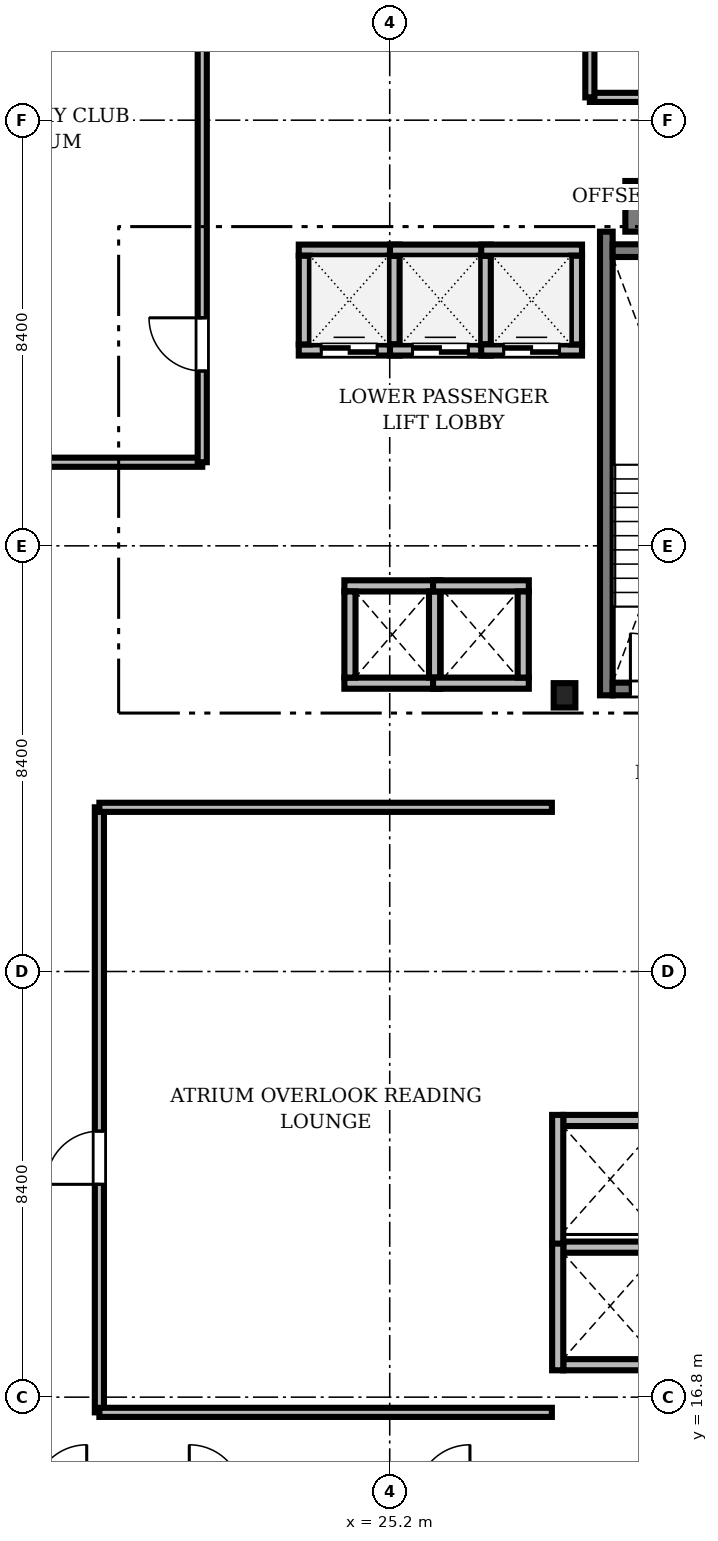
"""IFC4 building model, lengths in metres.
Left out: names, types, materials, properties, quantities, classifications, styles, units other than length and angle.
Written with IfcOpenShell. Run it as: python <this file> out.ifc"""

import sys

from ifc_helpers import new_model, si_unit, direction, frame, frame_2d, origin, origin_2d, place, context, subcontext, project, spatial, rectangle, i_section, extrude, source, transform, mapped, element, fill, save


model = new_model("IFC4")
c1 = context("Model", 3, precision=1e-05, world=origin(), true_north=direction((0.0, 1.0)))
c2 = subcontext(c1, "Body", "Model", "MODEL_VIEW")
j1 = project(units=[si_unit("LENGTHUNIT", "METRE"), si_unit("PLANEANGLEUNIT", "RADIAN")], contexts=[c1])
p1 = place(None, origin())
s1 = spatial("IfcSite", under=j1, at=p1, CompositionType="ELEMENT")
p2 = place(p1, origin())
s2 = spatial("IfcBuilding", under=s1, at=p2, CompositionType="ELEMENT")
p3 = place(p2, frame((0.0, 0.0, 82.35)))
s3 = spatial("IfcBuildingStorey", under=s2, at=p3, CompositionType="ELEMENT", Elevation=82.35)
m1 = source(origin(), c2, "Body", "SweptSolid", [
    extrude(rectangle(XDim=17.52, YDim=1.0, at=frame_2d((8.76, 0.0))), origin(), (0.0, 0.0, 1.0), 3.41),
])
p4 = place(p3, frame((29.85, 40.3, 0.0), z_axis=(0.0, 0.0, 1.0), x_axis=(1.0, 0.0, 0.0)))
e1 = element("IfcWall", 1, at=p4, inside=s3, PredefinedType="SHEAR", context=c2, shape_type="MappedRepresentation", body=[
    mapped(m1, transform((0.0, 0.0, 0.0), scale=1.0)),
])
m2 = source(origin(), c2, "Body", "SweptSolid", [
    extrude(i_section(OverallWidth=0.428, OverallDepth=0.481, WebThickness=0.04, FlangeThickness=0.063, FilletRadius=0.015, at=origin_2d()), origin(), (0.0, 0.0, 1.0), 3.41),
])
p5 = place(p3, frame((28.65, 30.65, 0.0), z_axis=(0.0, 0.0, 1.0), x_axis=(1.0, 0.0, 0.0)))
e2 = element("IfcColumn", 2, at=p5, inside=s3, PredefinedType="COLUMN", context=c2, shape_type="MappedRepresentation", body=[
    mapped(m2, transform((0.0, 0.0, 0.0), scale=1.0)),
])
m3 = source(origin(), c2, "Body", "SweptSolid", [
    extrude(rectangle(XDim=9.15, YDim=0.25, at=frame_2d((4.575, 0.0))), origin(), (0.0, 0.0, 1.0), 3.45),
])
p6 = place(p3, frame((29.475, 30.65, 0.0), z_axis=(0.0, 0.0, 1.0), x_axis=(0.0, 1.0, 0.0)))
e3 = element("IfcWall", 3, at=p6, inside=s3, PredefinedType="SOLIDWALL", context=c2, shape_type="MappedRepresentation", body=[
    mapped(m3, transform((0.0, 0.0, 0.0), scale=1.0)),
])
m4 = source(origin(), c2, "Body", "SweptSolid", [
    extrude(rectangle(XDim=3.15, YDim=0.25, at=frame_2d((1.575, 0.0))), origin(), (0.0, 0.0, 1.0), 3.45),
])
p7 = place(p3, frame((29.6, 39.425, 0.0), z_axis=(0.0, 0.0, 1.0), x_axis=(1.0, 0.0, 0.0)))
e4 = element("IfcWall", 4, at=p7, inside=s3, PredefinedType="SOLIDWALL", context=c2, shape_type="MappedRepresentation", body=[
    mapped(m4, transform((0.0, 0.0, 0.0), scale=1.0)),
])
p8 = place(p3, frame((29.6, 30.775, 0.0), z_axis=(0.0, 0.0, 1.0), x_axis=(1.0, 0.0, 0.0)))
e5 = element("IfcWall", 5, at=p8, inside=s3, PredefinedType="SOLIDWALL", context=c2, shape_type="MappedRepresentation", body=[
    mapped(m4, transform((0.0, 0.0, 0.0), scale=1.0)),
])
m5 = source(origin(), c2, "Body", "SweptSolid", [
    extrude(rectangle(XDim=1.1, YDim=2.2, at=frame_2d((0.55, 1.1))), frame((0.0, 0.135, 0.0), z_axis=(0.0, -1.0, 0.0), x_axis=(1.0, 0.0, 0.0)), (0.0, 0.0, 1.0), 0.27),
])
p9 = place(p8, frame((0.35, 0.0, 0.0)))
e6 = element("IfcOpeningElement", 6, at=p9, cuts=e5, PredefinedType="OPENING", context=c2, shape_type="MappedRepresentation", body=[
    mapped(m5, transform((0.0, 0.0, 0.0), scale=1.0)),
])
m6 = source(origin(), c2, "Body", "SweptSolid", [
    extrude(rectangle(XDim=1.99, YDim=0.22, at=frame_2d((0.995, 0.0))), origin(), (0.0, 0.0, 1.0), 3.41),
])
p10 = place(p3, frame((23.405, 37.465, 0.0), z_axis=(0.0, 0.0, 1.0), x_axis=(1.0, 0.0, 0.0)))
e7 = element("IfcWall", 7, at=p10, inside=s3, PredefinedType="SOLIDWALL", context=c2, shape_type="MappedRepresentation", body=[
    mapped(m6, transform((0.0, 0.0, 0.0), scale=1.0)),
])
m7 = source(origin(), c2, "Body", "SweptSolid", [
    extrude(rectangle(XDim=1.1, YDim=2.2, at=frame_2d((0.55, 1.1))), frame((0.0, 0.12, 0.0), z_axis=(0.0, -1.0, 0.0), x_axis=(1.0, 0.0, 0.0)), (0.0, 0.0, 1.0), 0.24),
])
p11 = place(p10, frame((0.445, 0.0, 0.0)))
e8 = element("IfcOpeningElement", 8, at=p11, cuts=e7, PredefinedType="OPENING", context=c2, shape_type="MappedRepresentation", body=[
    mapped(m7, transform((0.0, 0.0, 0.0), scale=1.0)),
])
p12 = place(p3, frame((23.405, 39.435, 0.0), z_axis=(0.0, 0.0, 1.0), x_axis=(1.0, 0.0, 0.0)))
e9 = element("IfcWall", 9, at=p12, inside=s3, PredefinedType="SOLIDWALL", context=c2, shape_type="MappedRepresentation", body=[
    mapped(m6, transform((0.0, 0.0, 0.0), scale=1.0)),
])
m8 = source(origin(), c2, "Body", "SweptSolid", [
    extrude(rectangle(XDim=1.75, YDim=0.22, at=frame_2d((0.875, 0.0))), origin(), (0.0, 0.0, 1.0), 3.41),
])
for number, where, z_axis, x_axis in (
    (10, (23.515, 37.575, 0.0), (0.0, 0.0, 1.0), (0.0, 1.0, 0.0)),
    (11, (25.285, 37.575, 0.0), (0.0, 0.0, 1.0), (0.0, 1.0, 0.0)),
):
    element("IfcWall", number, at=place(p3, frame(where, z_axis=z_axis, x_axis=x_axis)), inside=s3, PredefinedType="SOLIDWALL", context=c2, shape_type="MappedRepresentation", body=[
        mapped(m8, transform((0.0, 0.0, 0.0), scale=1.0)),
    ])
p13 = place(p3, frame((25.205, 37.465, 0.0), z_axis=(0.0, 0.0, 1.0), x_axis=(1.0, 0.0, 0.0)))
e12 = element("IfcWall", 12, at=p13, inside=s3, PredefinedType="SOLIDWALL", context=c2, shape_type="MappedRepresentation", body=[
    mapped(m6, transform((0.0, 0.0, 0.0), scale=1.0)),
])
p14 = place(p13, frame((0.445, 0.0, 0.0)))
e13 = element("IfcOpeningElement", 13, at=p14, cuts=e12, PredefinedType="OPENING", context=c2, shape_type="MappedRepresentation", body=[
    mapped(m7, transform((0.0, 0.0, 0.0), scale=1.0)),
])
p15 = place(p3, frame((25.205, 39.435, 0.0), z_axis=(0.0, 0.0, 1.0), x_axis=(1.0, 0.0, 0.0)))
e14 = element("IfcWall", 14, at=p15, inside=s3, PredefinedType="SOLIDWALL", context=c2, shape_type="MappedRepresentation", body=[
    mapped(m6, transform((0.0, 0.0, 0.0), scale=1.0)),
])
p16 = place(p3, frame((27.085, 37.575, 0.0), z_axis=(0.0, 0.0, 1.0), x_axis=(0.0, 1.0, 0.0)))
e15 = element("IfcWall", 15, at=p16, inside=s3, PredefinedType="SOLIDWALL", context=c2, shape_type="MappedRepresentation", body=[
    mapped(m8, transform((0.0, 0.0, 0.0), scale=1.0)),
])
m9 = source(origin(), c2, "Body", "SweptSolid", [
    extrude(rectangle(XDim=1.99, YDim=0.22, at=frame_2d((0.995, 0.0))), origin(), (0.0, 0.0, 1.0), 3.41),
])
p17 = place(p3, frame((27.005, 37.465, 0.0), z_axis=(0.0, 0.0, 1.0), x_axis=(1.0, 0.0, 0.0)))
e16 = element("IfcWall", 16, at=p17, inside=s3, PredefinedType="SOLIDWALL", context=c2, shape_type="MappedRepresentation", body=[
    mapped(m9, transform((0.0, 0.0, 0.0), scale=1.0)),
])
p18 = place(p17, frame((0.445, 0.0, 0.0)))
e17 = element("IfcOpeningElement", 17, at=p18, cuts=e16, PredefinedType="OPENING", context=c2, shape_type="MappedRepresentation", body=[
    mapped(m7, transform((0.0, 0.0, 0.0), scale=1.0)),
])
p19 = place(p3, frame((27.005, 39.435, 0.0), z_axis=(0.0, 0.0, 1.0), x_axis=(1.0, 0.0, 0.0)))
e18 = element("IfcWall", 18, at=p19, inside=s3, PredefinedType="SOLIDWALL", context=c2, shape_type="MappedRepresentation", body=[
    mapped(m9, transform((0.0, 0.0, 0.0), scale=1.0)),
])
p20 = place(p3, frame((28.885, 37.575, 0.0), z_axis=(0.0, 0.0, 1.0), x_axis=(0.0, 1.0, 0.0)))
e19 = element("IfcWall", 19, at=p20, inside=s3, PredefinedType="SOLIDWALL", context=c2, shape_type="MappedRepresentation", body=[
    mapped(m8, transform((0.0, 0.0, 0.0), scale=1.0)),
])
m10 = source(origin(), c2, "Body", "SweptSolid", [
    extrude(rectangle(XDim=1.89, YDim=0.22, at=frame_2d((0.945, 0.0))), origin(), (0.0, 0.0, 1.0), 3.41),
])
for number, where, z_axis, x_axis in (
    (20, (24.305, 30.89, 0.0), (0.0, 0.0, 1.0), (1.0, 0.0, 0.0)),
    (21, (24.305, 32.81, 0.0), (0.0, 0.0, 1.0), (1.0, 0.0, 0.0)),
):
    element("IfcWall", number, at=place(p3, frame(where, z_axis=z_axis, x_axis=x_axis)), inside=s3, PredefinedType="SOLIDWALL", context=c2, shape_type="MappedRepresentation", body=[
        mapped(m10, transform((0.0, 0.0, 0.0), scale=1.0)),
    ])
m11 = source(origin(), c2, "Body", "SweptSolid", [
    extrude(rectangle(XDim=1.7, YDim=0.22, at=frame_2d((0.85, 0.0))), origin(), (0.0, 0.0, 1.0), 3.41),
])
for number, where, z_axis, x_axis in (
    (22, (24.415, 31.0, 0.0), (0.0, 0.0, 1.0), (0.0, 1.0, 0.0)),
    (23, (26.085, 31.0, 0.0), (0.0, 0.0, 1.0), (0.0, 1.0, 0.0)),
):
    element("IfcWall", number, at=place(p3, frame(where, z_axis=z_axis, x_axis=x_axis)), inside=s3, PredefinedType="SOLIDWALL", context=c2, shape_type="MappedRepresentation", body=[
        mapped(m11, transform((0.0, 0.0, 0.0), scale=1.0)),
    ])
for number, where, z_axis, x_axis in (
    (24, (26.055, 30.89, 0.0), (0.0, 0.0, 1.0), (1.0, 0.0, 0.0)),
    (25, (26.055, 32.81, 0.0), (0.0, 0.0, 1.0), (1.0, 0.0, 0.0)),
):
    element("IfcWall", number, at=place(p3, frame(where, z_axis=z_axis, x_axis=x_axis)), inside=s3, PredefinedType="SOLIDWALL", context=c2, shape_type="MappedRepresentation", body=[
        mapped(m10, transform((0.0, 0.0, 0.0), scale=1.0)),
    ])
p21 = place(p3, frame((27.835, 31.0, 0.0), z_axis=(0.0, 0.0, 1.0), x_axis=(0.0, 1.0, 0.0)))
e26 = element("IfcWall", 26, at=p21, inside=s3, PredefinedType="SOLIDWALL", context=c2, shape_type="MappedRepresentation", body=[
    mapped(m11, transform((0.0, 0.0, 0.0), scale=1.0)),
])
m12 = source(origin(), c2, "Body", "SweptSolid", [
    extrude(rectangle(XDim=1.85, YDim=0.22, at=frame_2d((0.925, 0.0))), origin(), (0.0, 0.0, 1.0), 3.41),
])
for number, where, z_axis, x_axis in (
    (27, (28.625, 17.44, 0.0), (0.0, 0.0, 1.0), (1.0, 0.0, 0.0)),
    (28, (28.625, 19.76, 0.0), (0.0, 0.0, 1.0), (1.0, 0.0, 0.0)),
):
    element("IfcWall", number, at=place(p3, frame(where, z_axis=z_axis, x_axis=x_axis)), inside=s3, PredefinedType="SOLIDWALL", context=c2, shape_type="MappedRepresentation", body=[
        mapped(m12, transform((0.0, 0.0, 0.0), scale=1.0)),
    ])
m13 = source(origin(), c2, "Body", "SweptSolid", [
    extrude(rectangle(XDim=2.54, YDim=0.22, at=frame_2d((1.27, 0.0))), origin(), (0.0, 0.0, 1.0), 3.41),
])
p22 = place(p3, frame((28.515, 17.33, 0.0), z_axis=(0.0, 0.0, 1.0), x_axis=(0.0, 1.0, 0.0)))
e29 = element("IfcWall", 29, at=p22, inside=s3, PredefinedType="SOLIDWALL", context=c2, shape_type="MappedRepresentation", body=[
    mapped(m13, transform((0.0, 0.0, 0.0), scale=1.0)),
])
p23 = place(p3, frame((28.625, 22.26, 0.0), z_axis=(0.0, 0.0, 1.0), x_axis=(1.0, 0.0, 0.0)))
e30 = element("IfcWall", 30, at=p23, inside=s3, PredefinedType="SOLIDWALL", context=c2, shape_type="MappedRepresentation", body=[
    mapped(m12, transform((0.0, 0.0, 0.0), scale=1.0)),
])
p24 = place(p3, frame((28.515, 19.83, 0.0), z_axis=(0.0, 0.0, 1.0), x_axis=(0.0, 1.0, 0.0)))
e31 = element("IfcWall", 31, at=p24, inside=s3, PredefinedType="SOLIDWALL", context=c2, shape_type="MappedRepresentation", body=[
    mapped(m13, transform((0.0, 0.0, 0.0), scale=1.0)),
])
m14 = source(origin(), c2, "Body", "SweptSolid", [
    extrude(rectangle(XDim=19.428, YDim=0.18, at=frame_2d((9.714, 0.0))), origin(), (0.0, 0.0, 1.0), 2.652),
])
p25 = place(p3, frame((29.15, 42.45, 0.0), z_axis=(0.0, 0.0, 1.0), x_axis=(1.0, 0.0, 0.0)))
e32 = element("IfcWall", 32, at=p25, inside=s3, PredefinedType="PARTITIONING", context=c2, shape_type="MappedRepresentation", body=[
    mapped(m14, transform((0.0, 0.0, 0.0), scale=1.0)),
])
m15 = source(origin(), c2, "Body", "SweptSolid", [
    extrude(rectangle(XDim=1.05, YDim=2.2, at=frame_2d((0.525, 1.1))), frame((0.0, 0.1, 0.0), z_axis=(0.0, -1.0, 0.0), x_axis=(1.0, 0.0, 0.0)), (0.0, 0.0, 1.0), 0.2),
])
p26 = place(p25, frame((4.5, 0.0, 0.0)))
e33 = element("IfcOpeningElement", 33, at=p26, cuts=e32, PredefinedType="OPENING", context=c2, shape_type="MappedRepresentation", body=[
    mapped(m15, transform((0.0, 0.0, 0.0), scale=1.0)),
])
m16 = source(origin(), c2, "Body", "SweptSolid", [
    extrude(rectangle(XDim=19.078, YDim=0.18, at=frame_2d((9.539, 0.0))), origin(), (0.0, 0.0, 1.0), 2.652),
])
p27 = place(p3, frame((2.422, 35.25, 0.0), z_axis=(0.0, 0.0, 1.0), x_axis=(1.0, 0.0, 0.0)))
e34 = element("IfcWall", 34, at=p27, inside=s3, PredefinedType="PARTITIONING", context=c2, shape_type="MappedRepresentation", body=[
    mapped(m16, transform((0.0, 0.0, 0.0), scale=1.0)),
])
p28 = place(p27, frame((14.843, 0.0, 0.0)))
e35 = element("IfcOpeningElement", 35, at=p28, cuts=e34, PredefinedType="OPENING", context=c2, shape_type="MappedRepresentation", body=[
    mapped(m15, transform((0.0, 0.0, 0.0), scale=1.0)),
])
m17 = source(origin(), c2, "Body", "SweptSolid", [
    extrude(rectangle(XDim=13.028, YDim=0.18, at=frame_2d((6.514, 0.0))), origin(), (0.0, 0.0, 1.0), 2.652),
])
p29 = place(p3, frame((21.5, 35.25, 0.0), z_axis=(0.0, 0.0, 1.0), x_axis=(0.0, 1.0, 0.0)))
e36 = element("IfcWall", 36, at=p29, inside=s3, PredefinedType="PARTITIONING", context=c2, shape_type="MappedRepresentation", body=[
    mapped(m17, transform((0.0, 0.0, 0.0), scale=1.0)),
])
p30 = place(p29, frame((1.8, 0.0, 0.0)))
e37 = element("IfcOpeningElement", 37, at=p30, cuts=e36, PredefinedType="OPENING", context=c2, shape_type="MappedRepresentation", body=[
    mapped(m15, transform((0.0, 0.0, 0.0), scale=1.0)),
])
m18 = source(origin(), c2, "Body", "SweptSolid", [
    extrude(rectangle(XDim=11.94, YDim=0.18, at=frame_2d((5.97, 0.0))), origin(), (0.0, 0.0, 1.0), 2.802),
])
p31 = place(p3, frame((19.47, 16.5, 0.0), z_axis=(0.0, 0.0, 1.0), x_axis=(0.0, 1.0, 0.0)))
e38 = element("IfcWall", 38, at=p31, inside=s3, PredefinedType="PARTITIONING", context=c2, shape_type="MappedRepresentation", body=[
    mapped(m18, transform((0.0, 0.0, 0.0), scale=1.0)),
])
p32 = place(p31, frame((4.5, 0.0, 0.0)))
e39 = element("IfcOpeningElement", 39, at=p32, cuts=e38, PredefinedType="OPENING", context=c2, shape_type="MappedRepresentation", body=[
    mapped(m15, transform((0.0, 0.0, 0.0), scale=1.0)),
])
m19 = source(origin(), c2, "Body", "SweptSolid", [
    extrude(rectangle(XDim=8.93, YDim=0.18, at=frame_2d((4.465, 0.0))), origin(), (0.0, 0.0, 1.0), 2.802),
])
p33 = place(p3, frame((19.47, 16.5, 0.0), z_axis=(0.0, 0.0, 1.0), x_axis=(1.0, 0.0, 0.0)))
e40 = element("IfcWall", 40, at=p33, inside=s3, PredefinedType="PARTITIONING", context=c2, shape_type="MappedRepresentation", body=[
    mapped(m19, transform((0.0, 0.0, 0.0), scale=1.0)),
])
m20 = source(origin(), c2, "Body", "SweptSolid", [
    extrude(rectangle(XDim=8.93, YDim=0.18, at=frame_2d((4.465, 0.0))), origin(), (0.0, 0.0, 1.0), 3.41),
])
p34 = place(p3, frame((19.47, 28.44, 0.0), z_axis=(0.0, 0.0, 1.0), x_axis=(1.0, 0.0, 0.0)))
e41 = element("IfcWall", 41, at=p34, inside=s3, PredefinedType="PARTITIONING", context=c2, shape_type="MappedRepresentation", body=[
    mapped(m20, transform((0.0, 0.0, 0.0), scale=1.0)),
])
m21 = source(origin(), c2, "Body", "SweptSolid", [
    extrude(rectangle(XDim=5.828, YDim=0.18, at=frame_2d((2.914, 0.0))), origin(), (0.0, 0.0, 1.0), 2.652),
])
p35 = place(p3, frame((29.15, 42.45, 0.0), z_axis=(0.0, 0.0, 1.0), x_axis=(0.0, 1.0, 0.0)))
e42 = element("IfcWall", 42, at=p35, inside=s3, PredefinedType="PARTITIONING", context=c2, shape_type="MappedRepresentation", body=[
    mapped(m21, transform((0.0, 0.0, 0.0), scale=1.0)),
])
m22 = source(origin(), c2, "Body", "SweptSolid", [
    extrude(rectangle(XDim=1.1, YDim=2.2, at=frame_2d((0.55, 1.1))), frame((0.0, 0.025, 0.0), z_axis=(0.0, -1.0, 0.0), x_axis=(1.0, 0.0, 0.0)), (0.0, 0.0, 1.0), 0.05),
])
p36 = place(p9, origin())
e43 = element("IfcDoor", 43, at=p36, inside=s3, OperationType="SINGLE_SWING_LEFT", PredefinedType="DOOR", context=c2, shape_type="MappedRepresentation", body=[
    mapped(m22, transform((0.0, 0.0, 0.0), scale=1.0)),
])
fill(e6, e43)
p37 = place(p11, origin())
e44 = element("IfcDoor", 44, at=p37, inside=s3, OperationType="DOUBLE_DOOR_SLIDING", PredefinedType="DOOR", context=c2, shape_type="MappedRepresentation", body=[
    mapped(m22, transform((0.0, 0.0, 0.0), scale=1.0)),
])
fill(e8, e44)
p38 = place(p14, origin())
e45 = element("IfcDoor", 45, at=p38, inside=s3, OperationType="DOUBLE_DOOR_SLIDING", PredefinedType="DOOR", context=c2, shape_type="MappedRepresentation", body=[
    mapped(m22, transform((0.0, 0.0, 0.0), scale=1.0)),
])
fill(e13, e45)
p39 = place(p18, origin())
e46 = element("IfcDoor", 46, at=p39, inside=s3, OperationType="DOUBLE_DOOR_SLIDING", PredefinedType="DOOR", context=c2, shape_type="MappedRepresentation", body=[
    mapped(m22, transform((0.0, 0.0, 0.0), scale=1.0)),
])
fill(e17, e46)
m23 = source(origin(), c2, "Body", "SweptSolid", [
    extrude(rectangle(XDim=1.05, YDim=2.2, at=frame_2d((0.525, 1.1))), frame((0.0, 0.025, 0.0), z_axis=(0.0, -1.0, 0.0), x_axis=(1.0, 0.0, 0.0)), (0.0, 0.0, 1.0), 0.05),
])
p40 = place(p30, origin())
e47 = element("IfcDoor", 47, at=p40, inside=s3, OperationType="SINGLE_SWING_RIGHT", PredefinedType="DOOR", context=c2, shape_type="MappedRepresentation", body=[
    mapped(m23, transform((0.0, 0.0, 0.0), scale=1.0)),
])
fill(e37, e47)
p41 = place(p32, origin())
e48 = element("IfcDoor", 48, at=p41, inside=s3, OperationType="SINGLE_SWING_LEFT", PredefinedType="DOOR", context=c2, shape_type="MappedRepresentation", body=[
    mapped(m23, transform((0.0, 0.0, 0.0), scale=1.0)),
])
fill(e39, e48)
save(model, sys.argv[1])
